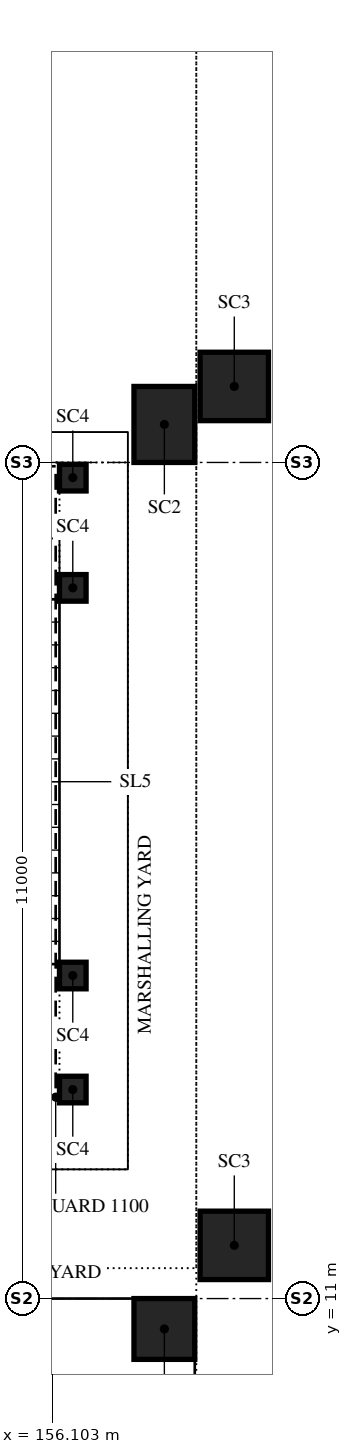
"""IFC4 building model, lengths in metres.
Left out: names, types, materials, properties, quantities, classifications, styles, units other than length and angle.
Written with IfcOpenShell. Run it as: python <this file> out.ifc"""

import sys

from ifc_helpers import new_model, si_unit, direction, frame, origin, origin_2d, place, context, subcontext, project, spatial, rectangle, extrude, element, save


model = new_model("IFC4")
c1 = context("Model", 3, precision=1e-05, world=origin(), true_north=direction((0.0, 1.0)))
c2 = subcontext(c1, "Body", "Model", "MODEL_VIEW")
j1 = project(units=[si_unit("LENGTHUNIT", "METRE"), si_unit("PLANEANGLEUNIT", "RADIAN")], contexts=[c1])
p1 = place(None, origin())
s1 = spatial("IfcSite", under=j1, at=p1, CompositionType="ELEMENT")
p2 = place(p1, origin())
s2 = spatial("IfcBuilding", under=s1, at=p2, CompositionType="ELEMENT")
p3 = place(p2, origin())
s3 = spatial("IfcBuildingStorey", under=s2, at=p3, CompositionType="ELEMENT", Elevation=0.0)
p4 = place(p3, frame((157.58, 10.6, -0.3), z_axis=(0.0, 0.0, 1.0), x_axis=(1.0, 0.0, 0.0)))
e1 = element("IfcColumn", 1, at=p4, inside=s3, PredefinedType="COLUMN", context=c2, shape_type="SweptSolid", body=[
    extrude(rectangle(XDim=0.8, YDim=0.8, at=origin_2d()), origin(), (0.0, 0.0, 1.0), 5.3),
])
p5 = place(p3, frame((157.58, 22.5, -0.3), z_axis=(0.0, 0.0, 1.0), x_axis=(1.0, 0.0, 0.0)))
e2 = element("IfcColumn", 2, at=p5, inside=s3, PredefinedType="COLUMN", context=c2, shape_type="SweptSolid", body=[
    extrude(rectangle(XDim=0.8, YDim=1.0, at=origin_2d()), origin(), (0.0, 0.0, 1.0), 5.3),
])
for number, where, z_axis, x_axis in (
    (3, (158.5, 11.7, -0.3), (0.0, 0.0, 1.0), (1.0, 0.0, 0.0)),
    (4, (158.5, 23.0, -0.3), (0.0, 0.0, 1.0), (1.0, 0.0, 0.0)),
):
    element("IfcColumn", number, at=place(p3, frame(where, z_axis=z_axis, x_axis=x_axis)), inside=s3, PredefinedType="COLUMN", context=c2, shape_type="SweptSolid", body=[
        extrude(rectangle(XDim=0.9, YDim=0.9, at=origin_2d()), origin(), (0.0, 0.0, 1.0), 5.3),
    ])
for number, where, z_axis, x_axis in (
    (5, (156.375, 21.8, -0.3), (0.0, 0.0, 1.0), (1.0, 0.0, 0.0)),
    (6, (156.375, 20.35, -0.3), (0.0, 0.0, 1.0), (1.0, 0.0, 0.0)),
    (7, (156.375, 15.25, -0.3), (0.0, 0.0, 1.0), (1.0, 0.0, 0.0)),
    (8, (156.375, 13.75, -0.3), (0.0, 0.0, 1.0), (1.0, 0.0, 0.0)),
):
    element("IfcColumn", number, at=place(p3, frame(where, z_axis=z_axis, x_axis=x_axis)), inside=s3, PredefinedType="COLUMN", context=c2, shape_type="SweptSolid", body=[
        extrude(rectangle(XDim=0.35, YDim=0.35, at=origin_2d()), origin(), (0.0, 0.0, 1.0), 5.3),
    ])
save(model, sys.argv[1])
